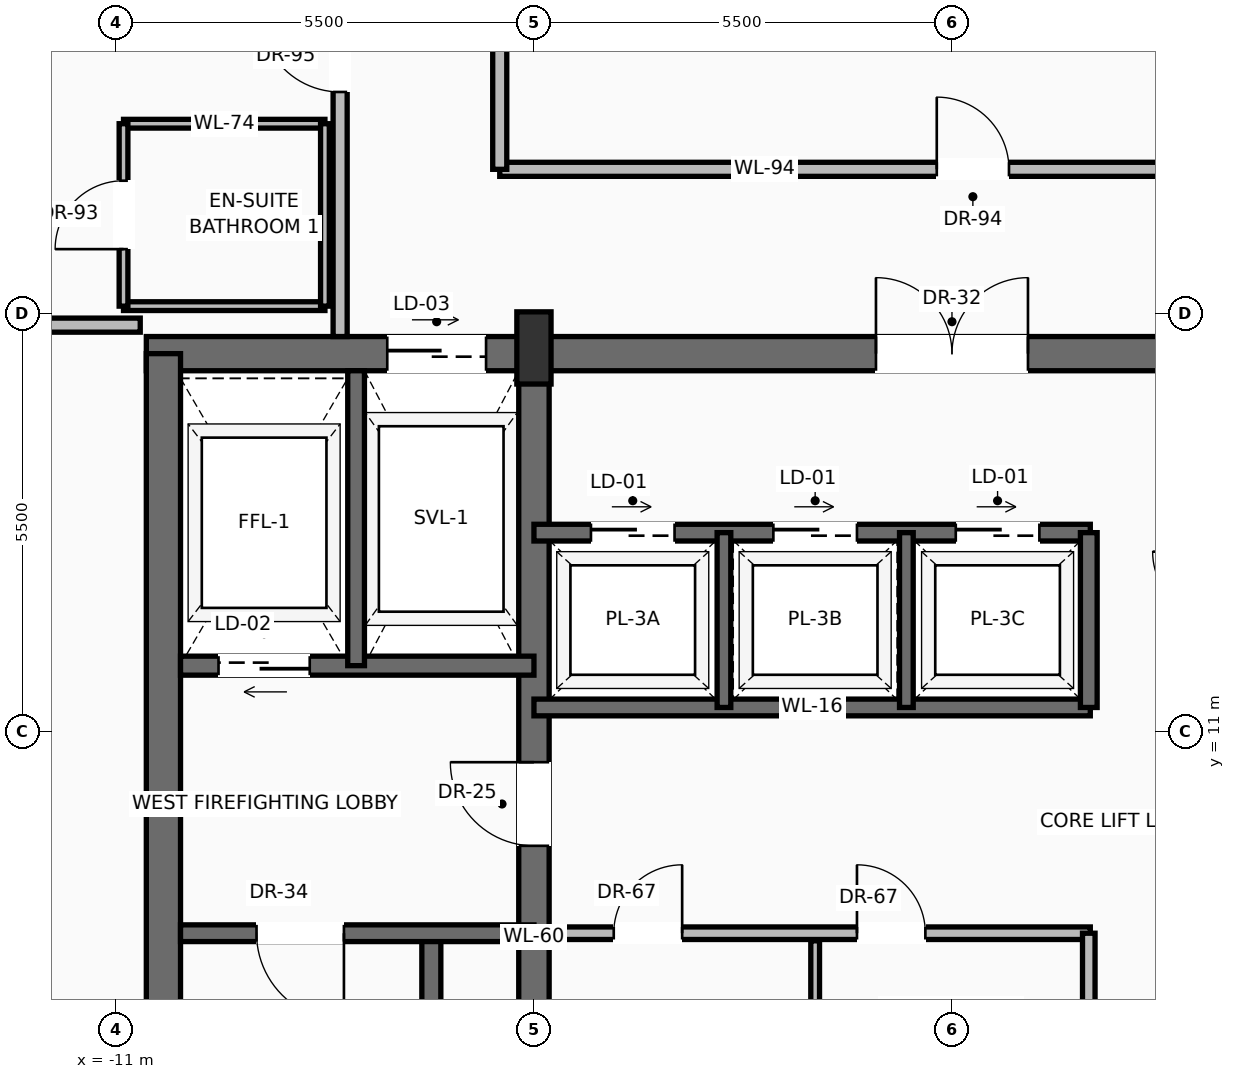
"""IFC4 building model, lengths in metres.
Left out: names, types, materials, properties, quantities, classifications, styles, units other than length and angle.
Written with IfcOpenShell. Run it as: python <this file> out.ifc"""

import sys

from ifc_helpers import new_model, si_unit, direction, frame, frame_2d, origin, origin_2d, place, context, subcontext, project, spatial, rectangle, extrude, source, transform, mapped, element, fill, save


model = new_model("IFC4")
c1 = context("Model", 3, precision=1e-05, world=origin(), true_north=direction((0.0, 1.0)))
c2 = subcontext(c1, "Body", "Model", "MODEL_VIEW")
j1 = project(units=[si_unit("LENGTHUNIT", "METRE"), si_unit("PLANEANGLEUNIT", "RADIAN")], contexts=[c1])
p1 = place(None, origin())
s1 = spatial("IfcSite", under=j1, at=p1, CompositionType="ELEMENT")
p2 = place(p1, origin())
s2 = spatial("IfcBuilding", under=s1, at=p2, CompositionType="ELEMENT")
p3 = place(p2, frame((0.0, 0.0, 283.35)))
s3 = spatial("IfcBuildingStorey", under=s2, at=p3, CompositionType="ELEMENT", Elevation=283.35)
p4 = place(p3, frame((-10.6, 15.975, 0.0), z_axis=(0.0, 0.0, 1.0), x_axis=(1.0, 0.0, 0.0)))
e1 = element("IfcWall", 1, at=p4, inside=s3, PredefinedType="SHEAR", context=c2, shape_type="SweptSolid", body=[
    extrude(rectangle(XDim=21.2, YDim=0.45, at=frame_2d((10.6, 0.0))), origin(), (0.0, 0.0, 1.0), 3.24),
])
p5 = place(p4, frame((3.17, 0.0, 0.0)))
e2 = element("IfcOpeningElement", 2, at=p5, cuts=e1, PredefinedType="OPENING", context=c2, shape_type="SweptSolid", body=[
    extrude(rectangle(XDim=1.3, YDim=2.3, at=frame_2d((0.65, 1.15))), frame((0.0, 0.235, 0.0), z_axis=(0.0, -1.0, 0.0), x_axis=(1.0, 0.0, 0.0)), (0.0, 0.0, 1.0), 0.47),
])
p6 = place(p4, frame((9.6, 0.0, 0.0)))
e3 = element("IfcOpeningElement", 3, at=p6, cuts=e1, PredefinedType="OPENING", context=c2, shape_type="SweptSolid", body=[
    extrude(rectangle(XDim=2.0, YDim=2.4, at=frame_2d((1.0, 1.2))), frame((0.0, 0.235, 0.0), z_axis=(0.0, -1.0, 0.0), x_axis=(1.0, 0.0, 0.0)), (0.0, 0.0, 1.0), 0.47),
])
p7 = place(p3, frame((-10.375, 0.625, 0.0), z_axis=(0.0, 0.0, 1.0), x_axis=(0.0, 1.0, 0.0)))
e4 = element("IfcWall", 4, at=p7, inside=s3, PredefinedType="SHEAR", context=c2, shape_type="SweptSolid", body=[
    extrude(rectangle(XDim=15.35, YDim=0.45, at=frame_2d((7.675, 0.0))), origin(), (0.0, 0.0, 1.0), 3.24),
])
p8 = place(p3, frame((-5.5, 0.625, 0.0), z_axis=(0.0, 0.0, 1.0), x_axis=(0.0, 1.0, 0.0)))
e5 = element("IfcWall", 5, at=p8, inside=s3, PredefinedType="SHEAR", context=c2, shape_type="SweptSolid", body=[
    extrude(rectangle(XDim=15.35, YDim=0.4, at=frame_2d((7.675, 0.0))), origin(), (0.0, 0.0, 1.0), 3.24),
])
p9 = place(p8, frame((8.875, 0.0, 0.0)))
e6 = element("IfcOpeningElement", 6, at=p9, cuts=e5, PredefinedType="OPENING", context=c2, shape_type="SweptSolid", body=[
    extrude(rectangle(XDim=1.1, YDim=2.2, at=frame_2d((0.55, 1.1))), frame((0.0, 0.21, 0.0), z_axis=(0.0, -1.0, 0.0), x_axis=(1.0, 0.0, 0.0)), (0.0, 0.0, 1.0), 0.42),
])
m1 = source(origin(), c2, "Body", "SweptSolid", [
    extrude(rectangle(XDim=0.45, YDim=0.95, at=origin_2d()), origin(), (0.0, 0.0, 1.0), 3.45),
])
p10 = place(p3, frame((-5.5, 16.05, 0.0), z_axis=(0.0, 0.0, 1.0), x_axis=(1.0, 0.0, 0.0)))
e7 = element("IfcColumn", 7, at=p10, inside=s3, PredefinedType="PILASTER", context=c2, shape_type="MappedRepresentation", body=[
    mapped(m1, transform((0.0, 0.0, 0.0), scale=1.0)),
])
p11 = place(p3, frame((-18.245, 14.072, 0.0), z_axis=(0.0, 0.0, 1.0), x_axis=(0.499006273731, 0.866598372244, 0.0)))
e8 = element("IfcWall", 8, at=p11, inside=s3, PredefinedType="SOLIDWALL", context=c2, shape_type="SweptSolid", body=[
    extrude(rectangle(XDim=20.19, YDim=0.28, at=frame_2d((10.095, 0.0))), origin(), (0.0, 0.0, 1.0), 2.82),
])
p12 = place(p11, frame((4.846, 0.0, 0.0)))
e9 = element("IfcOpeningElement", 9, at=p12, cuts=e8, PredefinedType="OPENING", context=c2, shape_type="SweptSolid", body=[
    extrude(rectangle(XDim=1.6, YDim=2.35, at=frame_2d((0.8, 1.175))), frame((0.0, 0.15, 0.0), z_axis=(0.0, -1.0, 0.0), x_axis=(1.0, 0.0, 0.0)), (0.0, 0.0, 1.0), 0.3),
])
p13 = place(p11, frame((13.729, 0.0, 0.9)))
e10 = element("IfcOpeningElement", 10, at=p13, cuts=e8, PredefinedType="OPENING", context=c2, shape_type="SweptSolid", body=[
    extrude(rectangle(XDim=2.0, YDim=1.75, at=frame_2d((1.0, 0.875))), frame((0.0, 0.15, 0.0), z_axis=(0.0, -1.0, 0.0), x_axis=(1.0, 0.0, 0.0)), (0.0, 0.0, 1.0), 0.3),
])
p14 = place(p3, frame((-6.85, 0.85, 0.0), z_axis=(0.0, 0.0, 1.0), x_axis=(0.0, 1.0, 0.0)))
e11 = element("IfcWall", 11, at=p14, inside=s3, PredefinedType="SOLIDWALL", context=c2, shape_type="SweptSolid", body=[
    extrude(rectangle(XDim=7.5, YDim=0.25, at=frame_2d((3.75, 0.0))), origin(), (0.0, 0.0, 1.0), 3.24),
])
p15 = place(p3, frame((-5.5, 8.35, 0.0), z_axis=(0.0, 0.0, 1.0), x_axis=(-1.0, 0.0, 0.0)))
e12 = element("IfcWall", 12, at=p15, inside=s3, PredefinedType="SOLIDWALL", context=c2, shape_type="SweptSolid", body=[
    extrude(rectangle(XDim=4.65, YDim=0.22, at=frame_2d((2.325, 0.0))), origin(), (0.0, 0.0, 1.0), 3.24),
])
p16 = place(p15, frame((2.5, 0.0, 0.0)))
e13 = element("IfcOpeningElement", 13, at=p16, cuts=e12, PredefinedType="OPENING", context=c2, shape_type="SweptSolid", body=[
    extrude(rectangle(XDim=1.15, YDim=2.2, at=frame_2d((0.575, 1.1))), frame((0.0, 0.12, 0.0), z_axis=(0.0, -1.0, 0.0), x_axis=(1.0, 0.0, 0.0)), (0.0, 0.0, 1.0), 0.24),
])
p17 = place(p3, frame((-5.5, 11.87, 0.0), z_axis=(0.0, 0.0, 1.0), x_axis=(-1.0, 0.0, 0.0)))
e14 = element("IfcWall", 14, at=p17, inside=s3, PredefinedType="SOLIDWALL", context=c2, shape_type="SweptSolid", body=[
    extrude(rectangle(XDim=4.65, YDim=0.25, at=frame_2d((2.325, 0.0))), origin(), (0.0, 0.0, 1.0), 3.24),
])
p18 = place(p17, frame((2.95, 0.0, 0.0)))
e15 = element("IfcOpeningElement", 15, at=p18, cuts=e14, PredefinedType="OPENING", context=c2, shape_type="SweptSolid", body=[
    extrude(rectangle(XDim=1.2, YDim=2.25, at=frame_2d((0.6, 1.125))), frame((0.0, 0.135, 0.0), z_axis=(0.0, -1.0, 0.0), x_axis=(1.0, 0.0, 0.0)), (0.0, 0.0, 1.0), 0.27),
])
p19 = place(p3, frame((-7.84, 11.87, 0.0), z_axis=(0.0, 0.0, 1.0), x_axis=(0.0, 1.0, 0.0)))
e16 = element("IfcWall", 16, at=p19, inside=s3, PredefinedType="SOLIDWALL", context=c2, shape_type="SweptSolid", body=[
    extrude(rectangle(XDim=3.88, YDim=0.22, at=frame_2d((1.94, 0.0))), origin(), (0.0, 0.0, 1.0), 3.24),
])
p20 = place(p3, frame((-5.3, 8.35, 0.0), z_axis=(0.0, 0.0, 1.0), x_axis=(1.0, 0.0, 0.0)))
e17 = element("IfcWall", 17, at=p20, inside=s3, PredefinedType="PARTITIONING", context=c2, shape_type="SweptSolid", body=[
    extrude(rectangle(XDim=7.12, YDim=0.165, at=frame_2d((3.56, 0.0))), origin(), (0.0, 0.0, 1.0), 3.232),
])
p21 = place(p20, frame((0.85, 0.0, 0.0)))
e18 = element("IfcOpeningElement", 18, at=p21, cuts=e17, PredefinedType="OPENING", context=c2, shape_type="SweptSolid", body=[
    extrude(rectangle(XDim=0.9, YDim=2.1, at=frame_2d((0.45, 1.05))), frame((0.0, 0.093, 0.0), z_axis=(0.0, -1.0, 0.0), x_axis=(1.0, 0.0, 0.0)), (0.0, 0.0, 1.0), 0.185),
])
p22 = place(p20, frame((4.05, 0.0, 0.0)))
e19 = element("IfcOpeningElement", 19, at=p22, cuts=e17, PredefinedType="OPENING", context=c2, shape_type="SweptSolid", body=[
    extrude(rectangle(XDim=0.9, YDim=2.1, at=frame_2d((0.45, 1.05))), frame((0.0, 0.093, 0.0), z_axis=(0.0, -1.0, 0.0), x_axis=(1.0, 0.0, 0.0)), (0.0, 0.0, 1.0), 0.185),
])
p23 = place(p3, frame((1.8, 6.1, 0.0), z_axis=(0.0, 0.0, 1.0), x_axis=(0.0, 1.0, 0.0)))
e20 = element("IfcWall", 20, at=p23, inside=s3, PredefinedType="PARTITIONING", context=c2, shape_type="SweptSolid", body=[
    extrude(rectangle(XDim=2.25, YDim=0.165, at=frame_2d((1.125, 0.0))), origin(), (0.0, 0.0, 1.0), 3.232),
])
p24 = place(p3, frame((-1.8, 6.1, 0.0), z_axis=(0.0, 0.0, 1.0), x_axis=(0.0, 1.0, 0.0)))
e21 = element("IfcWall", 21, at=p24, inside=s3, PredefinedType="PARTITIONING", context=c2, shape_type="SweptSolid", body=[
    extrude(rectangle(XDim=2.15, YDim=0.115, at=frame_2d((1.075, 0.0))), origin(), (0.0, 0.0, 1.0), 3.232),
])
p25 = place(p3, frame((-5.5, 11.32, 0.0), z_axis=(0.0, 0.0, 1.0), x_axis=(1.0, 0.0, 0.0)))
e22 = element("IfcWall", 22, at=p25, inside=s3, PredefinedType="SOLIDWALL", context=c2, shape_type="SweptSolid", body=[
    extrude(rectangle(XDim=7.32, YDim=0.22, at=frame_2d((3.66, 0.0))), origin(), (0.0, 0.0, 1.0), 3.24),
])
p26 = place(p3, frame((-5.5, 13.62, 0.0), z_axis=(0.0, 0.0, 1.0), x_axis=(1.0, 0.0, 0.0)))
e23 = element("IfcWall", 23, at=p26, inside=s3, PredefinedType="SOLIDWALL", context=c2, shape_type="SweptSolid", body=[
    extrude(rectangle(XDim=7.32, YDim=0.22, at=frame_2d((3.66, 0.0))), origin(), (0.0, 0.0, 1.0), 3.24),
])
p27 = place(p26, frame((0.75, 0.0, 0.0)))
e24 = element("IfcOpeningElement", 24, at=p27, cuts=e23, PredefinedType="OPENING", context=c2, shape_type="SweptSolid", body=[
    extrude(rectangle(XDim=1.1, YDim=2.2, at=frame_2d((0.55, 1.1))), frame((0.0, 0.12, 0.0), z_axis=(0.0, -1.0, 0.0), x_axis=(1.0, 0.0, 0.0)), (0.0, 0.0, 1.0), 0.24),
])
p28 = place(p26, frame((3.15, 0.0, 0.0)))
e25 = element("IfcOpeningElement", 25, at=p28, cuts=e23, PredefinedType="OPENING", context=c2, shape_type="SweptSolid", body=[
    extrude(rectangle(XDim=1.1, YDim=2.2, at=frame_2d((0.55, 1.1))), frame((0.0, 0.12, 0.0), z_axis=(0.0, -1.0, 0.0), x_axis=(1.0, 0.0, 0.0)), (0.0, 0.0, 1.0), 0.24),
])
p29 = place(p26, frame((5.55, 0.0, 0.0)))
e26 = element("IfcOpeningElement", 26, at=p29, cuts=e23, PredefinedType="OPENING", context=c2, shape_type="SweptSolid", body=[
    extrude(rectangle(XDim=1.1, YDim=2.2, at=frame_2d((0.55, 1.1))), frame((0.0, 0.12, 0.0), z_axis=(0.0, -1.0, 0.0), x_axis=(1.0, 0.0, 0.0)), (0.0, 0.0, 1.0), 0.24),
])
p30 = place(p3, frame((1.8, 11.32, 0.0), z_axis=(0.0, 0.0, 1.0), x_axis=(0.0, 1.0, 0.0)))
e27 = element("IfcWall", 27, at=p30, inside=s3, PredefinedType="SOLIDWALL", context=c2, shape_type="SweptSolid", body=[
    extrude(rectangle(XDim=2.3, YDim=0.22, at=frame_2d((1.15, 0.0))), origin(), (0.0, 0.0, 1.0), 3.24),
])
for number, where, z_axis, x_axis in (
    (28, (-3.0, 11.32, 0.0), (0.0, 0.0, 1.0), (0.0, 1.0, 0.0)),
    (29, (-0.6, 11.32, 0.0), (0.0, 0.0, 1.0), (0.0, 1.0, 0.0)),
):
    element("IfcWall", number, at=place(p3, frame(where, z_axis=z_axis, x_axis=x_axis)), inside=s3, PredefinedType="SOLIDWALL", context=c2, shape_type="SweptSolid", body=[
        extrude(rectangle(XDim=2.3, YDim=0.18, at=frame_2d((1.15, 0.0))), origin(), (0.0, 0.0, 1.0), 3.24),
    ])
p31 = place(p3, frame((-5.95, 18.4, 0.0), z_axis=(0.0, 0.0, 1.0), x_axis=(1.0, 0.0, 0.0)))
e30 = element("IfcWall", 30, at=p31, inside=s3, PredefinedType="PARTITIONING", context=c2, shape_type="SweptSolid", body=[
    extrude(rectangle(XDim=12.45, YDim=0.185, at=frame_2d((6.225, 0.0))), origin(), (0.0, 0.0, 1.0), 3.232),
])
p32 = place(p31, frame((5.75, 0.0, 0.0)))
e31 = element("IfcOpeningElement", 31, at=p32, cuts=e30, PredefinedType="OPENING", context=c2, shape_type="SweptSolid", body=[
    extrude(rectangle(XDim=0.95, YDim=2.2, at=frame_2d((0.475, 1.1))), frame((0.0, 0.103, 0.0), z_axis=(0.0, -1.0, 0.0), x_axis=(1.0, 0.0, 0.0)), (0.0, 0.0, 1.0), 0.205),
])
p33 = place(p3, frame((-5.95, 18.4, 0.0), z_axis=(0.0, 0.0, 1.0), x_axis=(0.0, 1.0, 0.0)))
e32 = element("IfcWall", 32, at=p33, inside=s3, PredefinedType="PARTITIONING", context=c2, shape_type="SweptSolid", body=[
    extrude(rectangle(XDim=8.1, YDim=0.185, at=frame_2d((4.05, 0.0))), origin(), (0.0, 0.0, 1.0), 3.232),
])
p34 = place(p3, frame((-8.05, 16.2, 0.0), z_axis=(0.0, 0.0, 1.0), x_axis=(0.0, 1.0, 0.0)))
e33 = element("IfcWall", 33, at=p34, inside=s3, PredefinedType="PARTITIONING", context=c2, shape_type="SweptSolid", body=[
    extrude(rectangle(XDim=12.4, YDim=0.185, at=frame_2d((6.2, 0.0))), origin(), (0.0, 0.0, 1.0), 3.232),
])
p35 = place(p34, frame((3.218, 0.0, 0.0)))
e34 = element("IfcOpeningElement", 34, at=p35, cuts=e33, PredefinedType="OPENING", context=c2, shape_type="SweptSolid", body=[
    extrude(rectangle(XDim=1.05, YDim=2.25, at=frame_2d((0.525, 1.125))), frame((0.0, 0.103, 0.0), z_axis=(0.0, -1.0, 0.0), x_axis=(1.0, 0.0, 0.0)), (0.0, 0.0, 1.0), 0.205),
])
p36 = place(p34, frame((8.936, 0.0, 0.0)))
e35 = element("IfcOpeningElement", 35, at=p36, cuts=e33, PredefinedType="OPENING", context=c2, shape_type="SweptSolid", body=[
    extrude(rectangle(XDim=1.05, YDim=2.25, at=frame_2d((0.525, 1.125))), frame((0.0, 0.103, 0.0), z_axis=(0.0, -1.0, 0.0), x_axis=(1.0, 0.0, 0.0)), (0.0, 0.0, 1.0), 0.205),
])
p37 = place(p3, frame((-17.083, 16.35, 0.0), z_axis=(0.0, 0.0, 1.0), x_axis=(1.0, 0.0, 0.0)))
e36 = element("IfcWall", 36, at=p37, inside=s3, PredefinedType="PARTITIONING", context=c2, shape_type="SweptSolid", body=[
    extrude(rectangle(XDim=6.403, YDim=0.185, at=frame_2d((3.201, 0.0))), origin(), (0.0, 0.0, 1.0), 3.232),
])
p38 = place(p37, frame((3.535, 0.0, 0.0)))
e37 = element("IfcOpeningElement", 37, at=p38, cuts=e36, PredefinedType="OPENING", context=c2, shape_type="SweptSolid", body=[
    extrude(rectangle(XDim=1.05, YDim=2.25, at=frame_2d((0.525, 1.125))), frame((0.0, 0.103, 0.0), z_axis=(0.0, -1.0, 0.0), x_axis=(1.0, 0.0, 0.0)), (0.0, 0.0, 1.0), 0.205),
])
for number, where, z_axis, x_axis in (
    (38, (-10.9, 16.6, 0.0), (0.0, 0.0, 1.0), (1.0, 0.0, 0.0)),
    (39, (-10.9, 19.0, 0.0), (0.0, 0.0, 1.0), (1.0, 0.0, 0.0)),
):
    element("IfcWall", number, at=place(p3, frame(where, z_axis=z_axis, x_axis=x_axis)), inside=s3, PredefinedType="PARTITIONING", context=c2, shape_type="SweptSolid", body=[
        extrude(rectangle(XDim=2.65, YDim=0.115, at=frame_2d((1.325, 0.0))), origin(), (0.0, 0.0, 1.0), 3.232),
    ])
p39 = place(p3, frame((-10.9, 16.6, 0.0), z_axis=(0.0, 0.0, 1.0), x_axis=(0.0, 1.0, 0.0)))
e40 = element("IfcWall", 40, at=p39, inside=s3, PredefinedType="PARTITIONING", context=c2, shape_type="SweptSolid", body=[
    extrude(rectangle(XDim=2.4, YDim=0.115, at=frame_2d((1.2, 0.0))), origin(), (0.0, 0.0, 1.0), 3.232),
])
p40 = place(p39, frame((0.75, 0.0, 0.0)))
e41 = element("IfcOpeningElement", 41, at=p40, cuts=e40, PredefinedType="OPENING", context=c2, shape_type="SweptSolid", body=[
    extrude(rectangle(XDim=0.9, YDim=2.15, at=frame_2d((0.45, 1.075))), frame((0.0, 0.067, 0.0), z_axis=(0.0, -1.0, 0.0), x_axis=(1.0, 0.0, 0.0)), (0.0, 0.0, 1.0), 0.135),
])
p41 = place(p3, frame((-8.25, 16.6, 0.0), z_axis=(0.0, 0.0, 1.0), x_axis=(0.0, 1.0, 0.0)))
e42 = element("IfcWall", 42, at=p41, inside=s3, PredefinedType="PARTITIONING", context=c2, shape_type="SweptSolid", body=[
    extrude(rectangle(XDim=2.4, YDim=0.115, at=frame_2d((1.2, 0.0))), origin(), (0.0, 0.0, 1.0), 3.232),
])
m2 = source(origin(), c2, "Body", "SweptSolid", [
    extrude(rectangle(XDim=1.15, YDim=2.2, at=frame_2d((0.575, 1.1))), frame((0.0, 0.025, 0.0), z_axis=(0.0, -1.0, 0.0), x_axis=(1.0, 0.0, 0.0)), (0.0, 0.0, 1.0), 0.05),
])
p42 = place(p16, origin())
e43 = element("IfcDoor", 43, at=p42, inside=s3, OperationType="SINGLE_SWING_LEFT", PredefinedType="DOOR", context=c2, shape_type="MappedRepresentation", body=[
    mapped(m2, transform((0.0, 0.0, 0.0), scale=1.0)),
])
fill(e13, e43)
m3 = source(origin(), c2, "Body", "SweptSolid", [
    extrude(rectangle(XDim=1.1, YDim=2.2, at=frame_2d((0.55, 1.1))), frame((0.0, 0.025, 0.0), z_axis=(0.0, -1.0, 0.0), x_axis=(1.0, 0.0, 0.0)), (0.0, 0.0, 1.0), 0.05),
])
p43 = place(p9, origin())
e44 = element("IfcDoor", 44, at=p43, inside=s3, OperationType="SINGLE_SWING_RIGHT", PredefinedType="DOOR", context=c2, shape_type="MappedRepresentation", body=[
    mapped(m3, transform((0.0, 0.0, 0.0), scale=1.0)),
])
fill(e6, e44)
m4 = source(origin(), c2, "Body", "SweptSolid", [
    extrude(rectangle(XDim=1.2, YDim=2.25, at=frame_2d((0.6, 1.125))), frame((0.0, 0.025, 0.0), z_axis=(0.0, -1.0, 0.0), x_axis=(1.0, 0.0, 0.0)), (0.0, 0.0, 1.0), 0.05),
])
p44 = place(p18, origin())
e45 = element("IfcDoor", 45, at=p44, inside=s3, OperationType="SLIDING_TO_LEFT", PredefinedType="DOOR", context=c2, shape_type="MappedRepresentation", body=[
    mapped(m4, transform((0.0, 0.0, 0.0), scale=1.0)),
])
fill(e15, e45)
m5 = source(origin(), c2, "Body", "SweptSolid", [
    extrude(rectangle(XDim=1.3, YDim=2.3, at=frame_2d((0.65, 1.15))), frame((0.0, 0.025, 0.0), z_axis=(0.0, -1.0, 0.0), x_axis=(1.0, 0.0, 0.0)), (0.0, 0.0, 1.0), 0.05),
])
p45 = place(p5, origin())
e46 = element("IfcDoor", 46, at=p45, inside=s3, OperationType="SLIDING_TO_RIGHT", PredefinedType="DOOR", context=c2, shape_type="MappedRepresentation", body=[
    mapped(m5, transform((0.0, 0.0, 0.0), scale=1.0)),
])
fill(e2, e46)
m6 = source(origin(), c2, "Body", "SweptSolid", [
    extrude(rectangle(XDim=2.0, YDim=2.4, at=frame_2d((1.0, 1.2))), frame((0.0, 0.025, 0.0), z_axis=(0.0, -1.0, 0.0), x_axis=(1.0, 0.0, 0.0)), (0.0, 0.0, 1.0), 0.05),
])
p46 = place(p6, origin())
e47 = element("IfcDoor", 47, at=p46, inside=s3, OperationType="DOUBLE_DOOR_SINGLE_SWING", PredefinedType="DOOR", context=c2, shape_type="MappedRepresentation", body=[
    mapped(m6, transform((0.0, 0.0, 0.0), scale=1.0)),
])
fill(e3, e47)
m7 = source(origin(), c2, "Body", "SweptSolid", [
    extrude(rectangle(XDim=0.9, YDim=2.1, at=frame_2d((0.45, 1.05))), frame((0.0, 0.025, 0.0), z_axis=(0.0, -1.0, 0.0), x_axis=(1.0, 0.0, 0.0)), (0.0, 0.0, 1.0), 0.05),
])
p47 = place(p21, origin())
e48 = element("IfcDoor", 48, at=p47, inside=s3, OperationType="SINGLE_SWING_RIGHT", PredefinedType="DOOR", context=c2, shape_type="MappedRepresentation", body=[
    mapped(m7, transform((0.0, 0.0, 0.0), scale=1.0)),
])
fill(e18, e48)
p48 = place(p22, origin())
e49 = element("IfcDoor", 49, at=p48, inside=s3, OperationType="SINGLE_SWING_LEFT", PredefinedType="DOOR", context=c2, shape_type="MappedRepresentation", body=[
    mapped(m7, transform((0.0, 0.0, 0.0), scale=1.0)),
])
fill(e19, e49)
m8 = source(origin(), c2, "Body", "SweptSolid", [
    extrude(rectangle(XDim=1.1, YDim=2.2, at=frame_2d((0.55, 1.1))), frame((0.0, 0.025, 0.0), z_axis=(0.0, -1.0, 0.0), x_axis=(1.0, 0.0, 0.0)), (0.0, 0.0, 1.0), 0.05),
])
p49 = place(p27, origin())
e50 = element("IfcDoor", 50, at=p49, inside=s3, OperationType="SLIDING_TO_RIGHT", PredefinedType="DOOR", context=c2, shape_type="MappedRepresentation", body=[
    mapped(m8, transform((0.0, 0.0, 0.0), scale=1.0)),
])
fill(e24, e50)
p50 = place(p28, origin())
e51 = element("IfcDoor", 51, at=p50, inside=s3, OperationType="SLIDING_TO_RIGHT", PredefinedType="DOOR", context=c2, shape_type="MappedRepresentation", body=[
    mapped(m8, transform((0.0, 0.0, 0.0), scale=1.0)),
])
fill(e25, e51)
p51 = place(p29, origin())
e52 = element("IfcDoor", 52, at=p51, inside=s3, OperationType="SLIDING_TO_RIGHT", PredefinedType="DOOR", context=c2, shape_type="MappedRepresentation", body=[
    mapped(m8, transform((0.0, 0.0, 0.0), scale=1.0)),
])
fill(e26, e52)
m9 = source(origin(), c2, "Body", "SweptSolid", [
    extrude(rectangle(XDim=0.95, YDim=2.2, at=frame_2d((0.475, 1.1))), frame((0.0, 0.025, 0.0), z_axis=(0.0, -1.0, 0.0), x_axis=(1.0, 0.0, 0.0)), (0.0, 0.0, 1.0), 0.05),
])
p52 = place(p32, origin())
e53 = element("IfcDoor", 53, at=p52, inside=s3, OperationType="SINGLE_SWING_LEFT", PredefinedType="DOOR", context=c2, shape_type="MappedRepresentation", body=[
    mapped(m9, transform((0.0, 0.0, 0.0), scale=1.0)),
])
fill(e31, e53)
m10 = source(origin(), c2, "Body", "SweptSolid", [
    extrude(rectangle(XDim=1.05, YDim=2.25, at=frame_2d((0.525, 1.125))), frame((0.0, 0.025, 0.0), z_axis=(0.0, -1.0, 0.0), x_axis=(1.0, 0.0, 0.0)), (0.0, 0.0, 1.0), 0.05),
])
p53 = place(p35, origin())
e54 = element("IfcDoor", 54, at=p53, inside=s3, OperationType="SINGLE_SWING_RIGHT", PredefinedType="DOOR", context=c2, shape_type="MappedRepresentation", body=[
    mapped(m10, transform((0.0, 0.0, 0.0), scale=1.0)),
])
fill(e34, e54)
m11 = source(origin(), c2, "Body", "SweptSolid", [
    extrude(rectangle(XDim=0.9, YDim=2.15, at=frame_2d((0.45, 1.075))), frame((0.0, 0.025, 0.0), z_axis=(0.0, -1.0, 0.0), x_axis=(1.0, 0.0, 0.0)), (0.0, 0.0, 1.0), 0.05),
])
p54 = place(p40, origin())
e55 = element("IfcDoor", 55, at=p54, inside=s3, OperationType="SINGLE_SWING_LEFT", PredefinedType="DOOR", context=c2, shape_type="MappedRepresentation", body=[
    mapped(m11, transform((0.0, 0.0, 0.0), scale=1.0)),
])
fill(e41, e55)
save(model, sys.argv[1])
